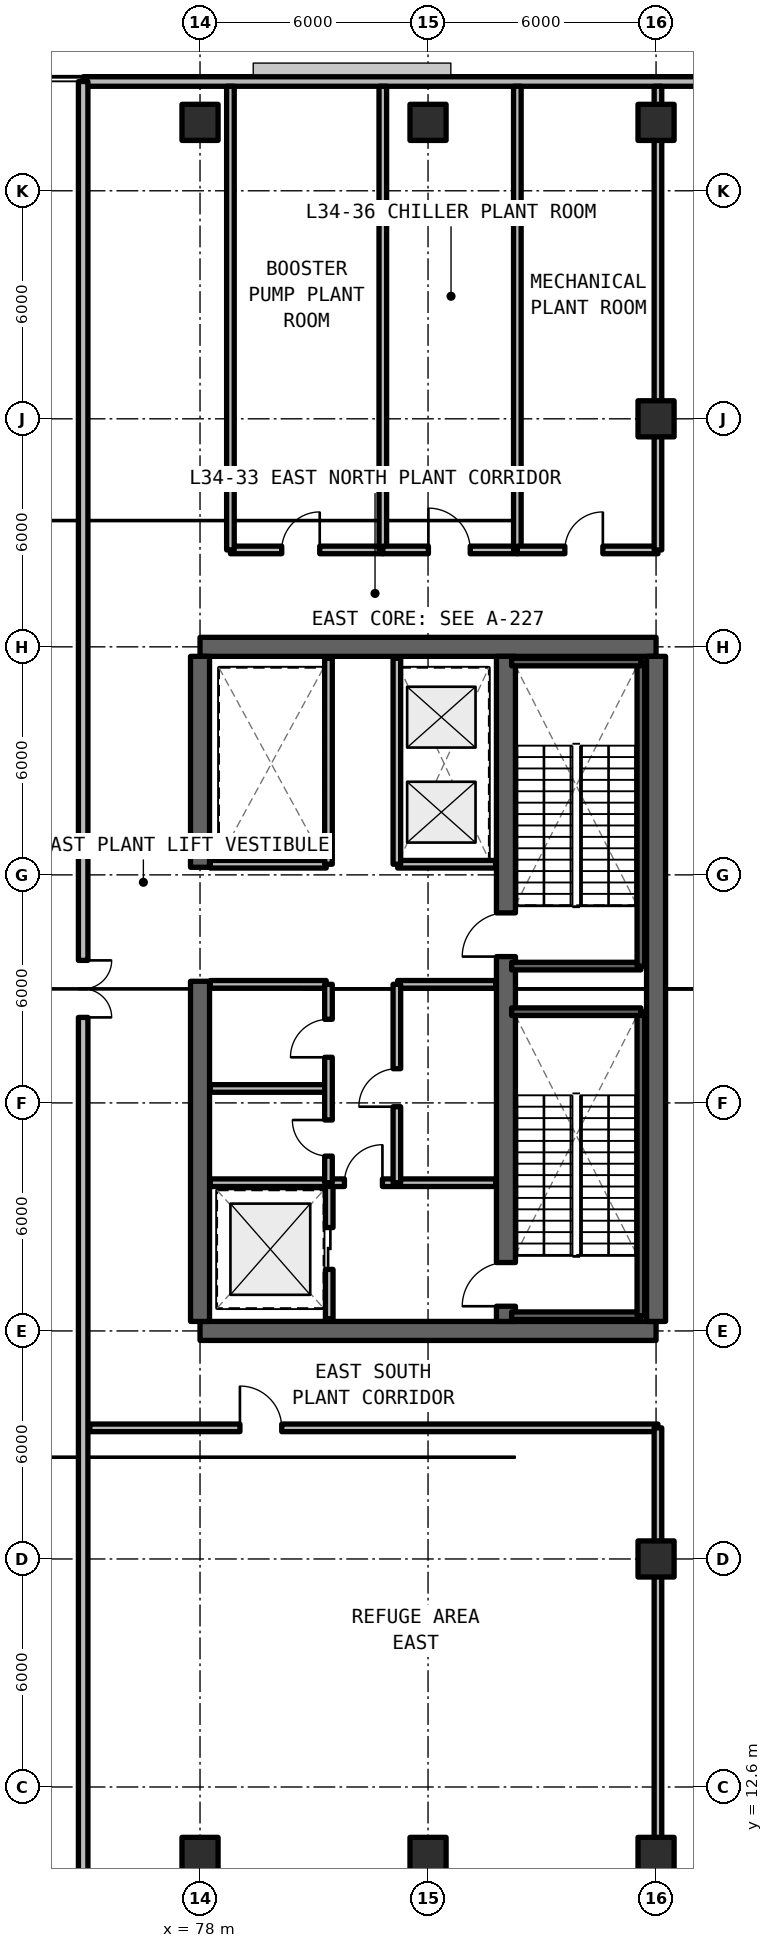
"""IFC4 building model, lengths in metres.
Left out: names, types, materials, properties, quantities, classifications, styles, units other than length and angle.
Written with IfcOpenShell. Run it as: python <this file> out.ifc"""

import sys

from ifc_helpers import new_model, si_unit, direction, frame, frame_2d, origin, origin_2d, place, context, subcontext, project, spatial, rectangle, extrude, element, fill, save


model = new_model("IFC4")
c1 = context("Model", 3, precision=1e-05, world=origin(), true_north=direction((0.0, 1.0)))
c2 = subcontext(c1, "Body", "Model", "MODEL_VIEW")
j1 = project(units=[si_unit("LENGTHUNIT", "METRE"), si_unit("PLANEANGLEUNIT", "RADIAN")], contexts=[c1])
p1 = place(None, origin())
s1 = spatial("IfcSite", under=j1, at=p1, CompositionType="ELEMENT")
p2 = place(p1, origin())
s2 = spatial("IfcBuilding", under=s1, at=p2, CompositionType="ELEMENT")
p3 = place(p2, frame((0.0, 0.0, 123.09)))
s3 = spatial("IfcBuildingStorey", under=s2, at=p3, CompositionType="ELEMENT", Elevation=123.09)
for number, where, z_axis, x_axis in (
    (1, (78.0, 24.6, 0.0), (0.0, 0.0, 1.0), (1.0, 0.0, 0.0)),
    (2, (90.0, 42.6, 0.0), (0.0, 0.0, 1.0), (-1.0, 0.0, 0.0)),
):
    element("IfcWall", number, at=place(p3, frame(where, z_axis=z_axis, x_axis=x_axis)), inside=s3, PredefinedType="SHEAR", context=c2, shape_type="SweptSolid", body=[
        extrude(rectangle(XDim=12.0, YDim=0.5, at=frame_2d((6.0, 0.0))), origin(), (0.0, 0.0, 1.0), 4.95),
    ])
p4 = place(p3, frame((90.0, 24.85, 0.0), z_axis=(0.0, 0.0, 1.0), x_axis=(0.0, 1.0, 0.0)))
e3 = element("IfcWall", 3, at=p4, inside=s3, PredefinedType="SHEAR", context=c2, shape_type="SweptSolid", body=[
    extrude(rectangle(XDim=17.5, YDim=0.5, at=frame_2d((8.75, 0.0))), origin(), (0.0, 0.0, 1.0), 4.95),
])
p5 = place(p3, frame((78.0, 24.85, 0.0), z_axis=(0.0, 0.0, 1.0), x_axis=(0.0, 1.0, 0.0)))
e4 = element("IfcWall", 4, at=p5, inside=s3, PredefinedType="SHEAR", context=c2, shape_type="SweptSolid", body=[
    extrude(rectangle(XDim=8.95, YDim=0.5, at=frame_2d((4.475, 0.0))), origin(), (0.0, 0.0, 1.0), 4.95),
])
p6 = place(p3, frame((78.0, 36.8, 0.0), z_axis=(0.0, 0.0, 1.0), x_axis=(0.0, 1.0, 0.0)))
e5 = element("IfcWall", 5, at=p6, inside=s3, PredefinedType="SHEAR", context=c2, shape_type="SweptSolid", body=[
    extrude(rectangle(XDim=5.55, YDim=0.5, at=frame_2d((2.775, 0.0))), origin(), (0.0, 0.0, 1.0), 4.95),
])
p7 = place(p3, frame((86.05, 24.85, 0.0), z_axis=(0.0, 0.0, 1.0), x_axis=(0.0, 1.0, 0.0)))
e6 = element("IfcWall", 6, at=p7, inside=s3, PredefinedType="SHEAR", context=c2, shape_type="SweptSolid", body=[
    extrude(rectangle(XDim=17.5, YDim=0.5, at=frame_2d((8.75, 0.0))), origin(), (0.0, 0.0, 1.0), 4.95),
])
p8 = place(p7, frame((0.4, 0.0, 0.0)))
e7 = element("IfcOpeningElement", 7, at=p8, cuts=e6, PredefinedType="OPENING", context=c2, shape_type="SweptSolid", body=[
    extrude(rectangle(XDim=1.15, YDim=2.15, at=frame_2d((0.575, 1.075))), frame((0.0, 0.26, 0.0), z_axis=(0.0, -1.0, 0.0), x_axis=(1.0, 0.0, 0.0)), (0.0, 0.0, 1.0), 0.52),
])
p9 = place(p7, frame((9.6, 0.0, 0.0)))
e8 = element("IfcOpeningElement", 8, at=p9, cuts=e6, PredefinedType="OPENING", context=c2, shape_type="SweptSolid", body=[
    extrude(rectangle(XDim=1.15, YDim=2.15, at=frame_2d((0.575, 1.075))), frame((0.0, 0.26, 0.0), z_axis=(0.0, -1.0, 0.0), x_axis=(1.0, 0.0, 0.0)), (0.0, 0.0, 1.0), 0.52),
])
for number, where, z_axis, x_axis in (
    (9, (90.0, 18.6, 0.0), (0.0, 0.0, 1.0), (1.0, 0.0, 0.0)),
    (10, (90.0, 48.6, 0.0), (0.0, 0.0, 1.0), (1.0, 0.0, 0.0)),
):
    element("IfcColumn", number, at=place(p3, frame(where, z_axis=z_axis, x_axis=x_axis)), inside=s3, PredefinedType="COLUMN", context=c2, shape_type="SweptSolid", body=[
        extrude(rectangle(XDim=0.95, YDim=0.95, at=origin_2d()), origin(), (0.0, 0.0, 1.0), 4.95),
    ])
for number, where, z_axis, x_axis in (
    (11, (78.0, 10.8, 0.0), (0.0, 0.0, 1.0), (1.0, 0.0, 0.0)),
    (12, (78.0, 56.4, 0.0), (0.0, 0.0, 1.0), (1.0, 0.0, 0.0)),
    (13, (84.0, 10.8, 0.0), (0.0, 0.0, 1.0), (1.0, 0.0, 0.0)),
    (14, (84.0, 56.4, 0.0), (0.0, 0.0, 1.0), (1.0, 0.0, 0.0)),
    (15, (90.0, 10.8, 0.0), (0.0, 0.0, 1.0), (1.0, 0.0, 0.0)),
    (16, (90.0, 56.4, 0.0), (0.0, 0.0, 1.0), (1.0, 0.0, 0.0)),
):
    element("IfcColumn", number, at=place(p3, frame(where, z_axis=z_axis, x_axis=x_axis)), inside=s3, PredefinedType="COLUMN", context=c2, shape_type="SweptSolid", body=[
        extrude(rectangle(XDim=0.95, YDim=0.95, at=origin_2d()), origin(), (0.0, 0.0, 1.0), 4.67),
    ])
p10 = place(p3, frame((96.148, 57.475, 0.0), z_axis=(0.0, 0.0, 1.0), x_axis=(-1.0, 0.0, 0.0)))
e17 = element("IfcWall", 17, at=p10, inside=s3, PredefinedType="SOLIDWALL", context=c2, shape_type="SweptSolid", body=[
    extrude(rectangle(XDim=21.223, YDim=0.25, at=frame_2d((10.612, 0.0))), origin(), (0.0, 0.0, 1.0), 4.67),
])
p11 = place(p3, frame((74.925, 57.475, 0.0), z_axis=(0.0, 0.0, 1.0), x_axis=(0.0, -1.0, 0.0)))
e18 = element("IfcWall", 18, at=p11, inside=s3, PredefinedType="SOLIDWALL", context=c2, shape_type="SweptSolid", body=[
    extrude(rectangle(XDim=47.75, YDim=0.25, at=frame_2d((23.875, 0.0))), origin(), (0.0, 0.0, 1.0), 4.67),
])
p12 = place(p11, frame((23.125, 0.0, 0.0)))
e19 = element("IfcOpeningElement", 19, at=p12, cuts=e18, PredefinedType="OPENING", context=c2, shape_type="SweptSolid", body=[
    extrude(rectangle(XDim=1.5, YDim=2.2, at=frame_2d((0.75, 1.1))), frame((0.0, 0.135, 0.0), z_axis=(0.0, -1.0, 0.0), x_axis=(1.0, 0.0, 0.0)), (0.0, 0.0, 1.0), 0.27),
])
p13 = place(p3, frame((81.4, 24.92, 0.0), z_axis=(0.0, 0.0, 1.0), x_axis=(0.0, 1.0, 0.0)))
e20 = element("IfcWall", 20, at=p13, inside=s3, PredefinedType="SOLIDWALL", context=c2, shape_type="SweptSolid", body=[
    extrude(rectangle(XDim=3.58, YDim=0.2, at=frame_2d((1.79, 0.0))), origin(), (0.0, 0.0, 1.0), 3.89),
])
p14 = place(p13, frame((1.3, 0.0, 0.0)))
e21 = element("IfcOpeningElement", 21, at=p14, cuts=e20, PredefinedType="OPENING", context=c2, shape_type="SweptSolid", body=[
    extrude(rectangle(XDim=1.1, YDim=2.2, at=frame_2d((0.55, 1.1))), frame((0.0, 0.11, 0.0), z_axis=(0.0, -1.0, 0.0), x_axis=(1.0, 0.0, 0.0)), (0.0, 0.0, 1.0), 0.22),
])
p15 = place(p3, frame((78.27, 28.5, 0.0), z_axis=(0.0, 0.0, 1.0), x_axis=(1.0, 0.0, 0.0)))
e22 = element("IfcWall", 22, at=p15, inside=s3, PredefinedType="SOLIDWALL", context=c2, shape_type="SweptSolid", body=[
    extrude(rectangle(XDim=7.51, YDim=0.2, at=frame_2d((3.755, 0.0))), origin(), (0.0, 0.0, 1.0), 3.89),
])
p16 = place(p15, frame((3.53, 0.0, 0.0)))
e23 = element("IfcOpeningElement", 23, at=p16, cuts=e22, PredefinedType="OPENING", context=c2, shape_type="SweptSolid", body=[
    extrude(rectangle(XDim=1.0, YDim=2.15, at=frame_2d((0.5, 1.075))), frame((0.0, 0.11, 0.0), z_axis=(0.0, -1.0, 0.0), x_axis=(1.0, 0.0, 0.0)), (0.0, 0.0, 1.0), 0.22),
])
p17 = place(p3, frame((83.2, 33.72, 0.0), z_axis=(0.0, 0.0, 1.0), x_axis=(1.0, 0.0, 0.0)))
e24 = element("IfcWall", 24, at=p17, inside=s3, PredefinedType="SOLIDWALL", context=c2, shape_type="SweptSolid", body=[
    extrude(rectangle(XDim=2.58, YDim=0.2, at=frame_2d((1.29, 0.0))), origin(), (0.0, 0.0, 1.0), 3.89),
])
p18 = place(p3, frame((83.18, 28.5, 0.0), z_axis=(0.0, 0.0, 1.0), x_axis=(0.0, 1.0, 0.0)))
e25 = element("IfcWall", 25, at=p18, inside=s3, PredefinedType="SOLIDWALL", context=c2, shape_type="SweptSolid", body=[
    extrude(rectangle(XDim=5.22, YDim=0.2, at=frame_2d((2.61, 0.0))), origin(), (0.0, 0.0, 1.0), 3.89),
])
p19 = place(p18, frame((2.0, 0.0, 0.0)))
e26 = element("IfcOpeningElement", 26, at=p19, cuts=e25, PredefinedType="OPENING", context=c2, shape_type="SweptSolid", body=[
    extrude(rectangle(XDim=1.0, YDim=2.15, at=frame_2d((0.5, 1.075))), frame((0.0, 0.11, 0.0), z_axis=(0.0, -1.0, 0.0), x_axis=(1.0, 0.0, 0.0)), (0.0, 0.0, 1.0), 0.22),
])
for number, where, z_axis, x_axis in (
    (27, (78.27, 30.98, 0.0), (0.0, 0.0, 1.0), (1.0, 0.0, 0.0)),
    (28, (78.27, 33.72, 0.0), (0.0, 0.0, 1.0), (1.0, 0.0, 0.0)),
):
    element("IfcWall", number, at=place(p3, frame(where, z_axis=z_axis, x_axis=x_axis)), inside=s3, PredefinedType="SOLIDWALL", context=c2, shape_type="SweptSolid", body=[
        extrude(rectangle(XDim=3.05, YDim=0.2, at=frame_2d((1.525, 0.0))), origin(), (0.0, 0.0, 1.0), 3.89),
    ])
p20 = place(p3, frame((81.38, 28.5, 0.0), z_axis=(0.0, 0.0, 1.0), x_axis=(0.0, 1.0, 0.0)))
e29 = element("IfcWall", 29, at=p20, inside=s3, PredefinedType="SOLIDWALL", context=c2, shape_type="SweptSolid", body=[
    extrude(rectangle(XDim=5.22, YDim=0.2, at=frame_2d((2.61, 0.0))), origin(), (0.0, 0.0, 1.0), 3.89),
])
p21 = place(p20, frame((0.7, 0.0, 0.0)))
e30 = element("IfcOpeningElement", 30, at=p21, cuts=e29, PredefinedType="OPENING", context=c2, shape_type="SweptSolid", body=[
    extrude(rectangle(XDim=0.95, YDim=2.15, at=frame_2d((0.475, 1.075))), frame((0.0, 0.11, 0.0), z_axis=(0.0, -1.0, 0.0), x_axis=(1.0, 0.0, 0.0)), (0.0, 0.0, 1.0), 0.22),
])
p22 = place(p20, frame((3.3, 0.0, 0.0)))
e31 = element("IfcOpeningElement", 31, at=p22, cuts=e29, PredefinedType="OPENING", context=c2, shape_type="SweptSolid", body=[
    extrude(rectangle(XDim=1.0, YDim=2.15, at=frame_2d((0.5, 1.075))), frame((0.0, 0.11, 0.0), z_axis=(0.0, -1.0, 0.0), x_axis=(1.0, 0.0, 0.0)), (0.0, 0.0, 1.0), 0.22),
])
p23 = place(p3, frame((83.2, 36.88, 0.0), z_axis=(0.0, 0.0, 1.0), x_axis=(1.0, 0.0, 0.0)))
e32 = element("IfcWall", 32, at=p23, inside=s3, PredefinedType="SOLIDWALL", context=c2, shape_type="SweptSolid", body=[
    extrude(rectangle(XDim=2.58, YDim=0.2, at=frame_2d((1.29, 0.0))), origin(), (0.0, 0.0, 1.0), 3.89),
])
p24 = place(p3, frame((83.18, 36.88, 0.0), z_axis=(0.0, 0.0, 1.0), x_axis=(0.0, 1.0, 0.0)))
e33 = element("IfcWall", 33, at=p24, inside=s3, PredefinedType="SOLIDWALL", context=c2, shape_type="SweptSolid", body=[
    extrude(rectangle(XDim=5.42, YDim=0.2, at=frame_2d((2.71, 0.0))), origin(), (0.0, 0.0, 1.0), 3.89),
])
p25 = place(p3, frame((78.27, 36.88, 0.0), z_axis=(0.0, 0.0, 1.0), x_axis=(1.0, 0.0, 0.0)))
e34 = element("IfcWall", 34, at=p25, inside=s3, PredefinedType="SOLIDWALL", context=c2, shape_type="SweptSolid", body=[
    extrude(rectangle(XDim=3.05, YDim=0.2, at=frame_2d((1.525, 0.0))), origin(), (0.0, 0.0, 1.0), 3.89),
])
p26 = place(p3, frame((81.38, 36.88, 0.0), z_axis=(0.0, 0.0, 1.0), x_axis=(0.0, 1.0, 0.0)))
e35 = element("IfcWall", 35, at=p26, inside=s3, PredefinedType="SOLIDWALL", context=c2, shape_type="SweptSolid", body=[
    extrude(rectangle(XDim=5.42, YDim=0.2, at=frame_2d((2.71, 0.0))), origin(), (0.0, 0.0, 1.0), 3.89),
])
p27 = place(p3, frame((75.1, 22.05, 0.0), z_axis=(0.0, 0.0, 1.0), x_axis=(1.0, 0.0, 0.0)))
e36 = element("IfcWall", 36, at=p27, inside=s3, PredefinedType="SOLIDWALL", context=c2, shape_type="SweptSolid", body=[
    extrude(rectangle(XDim=14.95, YDim=0.2, at=frame_2d((7.475, 0.0))), origin(), (0.0, 0.0, 1.0), 3.89),
])
p28 = place(p27, frame((3.95, 0.0, 0.0)))
e37 = element("IfcOpeningElement", 37, at=p28, cuts=e36, PredefinedType="OPENING", context=c2, shape_type="SweptSolid", body=[
    extrude(rectangle(XDim=1.1, YDim=2.15, at=frame_2d((0.55, 1.075))), frame((0.0, 0.11, 0.0), z_axis=(0.0, -1.0, 0.0), x_axis=(1.0, 0.0, 0.0)), (0.0, 0.0, 1.0), 0.22),
])
p29 = place(p3, frame((90.05, 9.85, 0.0), z_axis=(0.0, 0.0, 1.0), x_axis=(0.0, 1.0, 0.0)))
e38 = element("IfcWall", 38, at=p29, inside=s3, PredefinedType="SOLIDWALL", context=c2, shape_type="SweptSolid", body=[
    extrude(rectangle(XDim=12.2, YDim=0.2, at=frame_2d((6.1, 0.0))), origin(), (0.0, 0.0, 1.0), 3.647),
])
p30 = place(p3, frame((78.8, 45.15, 0.0), z_axis=(0.0, 0.0, 1.0), x_axis=(1.0, 0.0, 0.0)))
e39 = element("IfcWall", 39, at=p30, inside=s3, PredefinedType="SOLIDWALL", context=c2, shape_type="SweptSolid", body=[
    extrude(rectangle(XDim=4.01, YDim=0.2, at=frame_2d((2.005, 0.0))), origin(), (0.0, 0.0, 1.0), 3.89),
])
p31 = place(p30, frame((1.35, 0.0, 0.0)))
e40 = element("IfcOpeningElement", 40, at=p31, cuts=e39, PredefinedType="OPENING", context=c2, shape_type="SweptSolid", body=[
    extrude(rectangle(XDim=1.0, YDim=2.15, at=frame_2d((0.5, 1.075))), frame((0.0, 0.11, 0.0), z_axis=(0.0, -1.0, 0.0), x_axis=(1.0, 0.0, 0.0)), (0.0, 0.0, 1.0), 0.22),
])
for number, where, z_axis, x_axis in (
    (41, (78.8, 45.15, 0.0), (0.0, 0.0, 1.0), (0.0, 1.0, 0.0)),
    (42, (82.81, 45.15, 0.0), (0.0, 0.0, 1.0), (0.0, 1.0, 0.0)),
):
    element("IfcWall", number, at=place(p3, frame(where, z_axis=z_axis, x_axis=x_axis)), inside=s3, PredefinedType="SOLIDWALL", context=c2, shape_type="SweptSolid", body=[
        extrude(rectangle(XDim=12.2, YDim=0.2, at=frame_2d((6.1, 0.0))), origin(), (0.0, 0.0, 1.0), 3.89),
    ])
p32 = place(p3, frame((82.81, 45.15, 0.0), z_axis=(0.0, 0.0, 1.0), x_axis=(1.0, 0.0, 0.0)))
e43 = element("IfcWall", 43, at=p32, inside=s3, PredefinedType="SOLIDWALL", context=c2, shape_type="SweptSolid", body=[
    extrude(rectangle(XDim=3.54, YDim=0.2, at=frame_2d((1.77, 0.0))), origin(), (0.0, 0.0, 1.0), 3.89),
])
p33 = place(p32, frame((1.2, 0.0, 0.0)))
e44 = element("IfcOpeningElement", 44, at=p33, cuts=e43, PredefinedType="OPENING", context=c2, shape_type="SweptSolid", body=[
    extrude(rectangle(XDim=1.1, YDim=2.15, at=frame_2d((0.55, 1.075))), frame((0.0, 0.11, 0.0), z_axis=(0.0, -1.0, 0.0), x_axis=(1.0, 0.0, 0.0)), (0.0, 0.0, 1.0), 0.22),
])
p34 = place(p3, frame((86.35, 45.15, 0.0), z_axis=(0.0, 0.0, 1.0), x_axis=(0.0, 1.0, 0.0)))
e45 = element("IfcWall", 45, at=p34, inside=s3, PredefinedType="SOLIDWALL", context=c2, shape_type="SweptSolid", body=[
    extrude(rectangle(XDim=12.2, YDim=0.2, at=frame_2d((6.1, 0.0))), origin(), (0.0, 0.0, 1.0), 3.89),
])
p35 = place(p3, frame((86.35, 45.15, 0.0), z_axis=(0.0, 0.0, 1.0), x_axis=(1.0, 0.0, 0.0)))
e46 = element("IfcWall", 46, at=p35, inside=s3, PredefinedType="SOLIDWALL", context=c2, shape_type="SweptSolid", body=[
    extrude(rectangle(XDim=3.7, YDim=0.2, at=frame_2d((1.85, 0.0))), origin(), (0.0, 0.0, 1.0), 3.89),
])
p36 = place(p35, frame((1.25, 0.0, 0.0)))
e47 = element("IfcOpeningElement", 47, at=p36, cuts=e46, PredefinedType="OPENING", context=c2, shape_type="SweptSolid", body=[
    extrude(rectangle(XDim=1.0, YDim=2.15, at=frame_2d((0.5, 1.075))), frame((0.0, 0.11, 0.0), z_axis=(0.0, -1.0, 0.0), x_axis=(1.0, 0.0, 0.0)), (0.0, 0.0, 1.0), 0.22),
])
p37 = place(p3, frame((90.05, 45.15, 0.0), z_axis=(0.0, 0.0, 1.0), x_axis=(0.0, 1.0, 0.0)))
e48 = element("IfcWall", 48, at=p37, inside=s3, PredefinedType="SOLIDWALL", context=c2, shape_type="SweptSolid", body=[
    extrude(rectangle(XDim=12.2, YDim=0.2, at=frame_2d((6.1, 0.0))), origin(), (0.0, 0.0, 1.0), 3.647),
])
p38 = place(p3, frame((86.2, 25.0, 0.0), z_axis=(0.0, 0.0, 1.0), x_axis=(1.0, 0.0, 0.0)))
e49 = element("IfcWall", 49, at=p38, inside=s3, PredefinedType="SOLIDWALL", context=c2, shape_type="SweptSolid", body=[
    extrude(rectangle(XDim=3.4, YDim=0.2, at=frame_2d((1.7, 0.0))), origin(), (0.0, 0.0, 1.0), 4.95),
])
p39 = place(p3, frame((89.6, 25.0, 0.0), z_axis=(0.0, 0.0, 1.0), x_axis=(0.0, 1.0, 0.0)))
e50 = element("IfcWall", 50, at=p39, inside=s3, PredefinedType="SOLIDWALL", context=c2, shape_type="SweptSolid", body=[
    extrude(rectangle(XDim=8.0, YDim=0.2, at=frame_2d((4.0, 0.0))), origin(), (0.0, 0.0, 1.0), 4.95),
])
for number, where, z_axis, x_axis in (
    (51, (89.6, 33.0, 0.0), (0.0, 0.0, 1.0), (-1.0, 0.0, 0.0)),
    (52, (86.2, 34.2, 0.0), (0.0, 0.0, 1.0), (1.0, 0.0, 0.0)),
):
    element("IfcWall", number, at=place(p3, frame(where, z_axis=z_axis, x_axis=x_axis)), inside=s3, PredefinedType="SOLIDWALL", context=c2, shape_type="SweptSolid", body=[
        extrude(rectangle(XDim=3.4, YDim=0.2, at=frame_2d((1.7, 0.0))), origin(), (0.0, 0.0, 1.0), 4.95),
    ])
p40 = place(p3, frame((89.6, 34.2, 0.0), z_axis=(0.0, 0.0, 1.0), x_axis=(0.0, 1.0, 0.0)))
e53 = element("IfcWall", 53, at=p40, inside=s3, PredefinedType="SOLIDWALL", context=c2, shape_type="SweptSolid", body=[
    extrude(rectangle(XDim=8.0, YDim=0.2, at=frame_2d((4.0, 0.0))), origin(), (0.0, 0.0, 1.0), 4.95),
])
p41 = place(p3, frame((89.6, 42.2, 0.0), z_axis=(0.0, 0.0, 1.0), x_axis=(-1.0, 0.0, 0.0)))
e54 = element("IfcWall", 54, at=p41, inside=s3, PredefinedType="SOLIDWALL", context=c2, shape_type="SweptSolid", body=[
    extrude(rectangle(XDim=3.4, YDim=0.2, at=frame_2d((1.7, 0.0))), origin(), (0.0, 0.0, 1.0), 4.95),
])
p42 = place(p12, origin())
e55 = element("IfcDoor", 55, at=p42, inside=s3, OperationType="SINGLE_SWING_LEFT", PredefinedType="DOOR", context=c2, shape_type="SweptSolid", body=[
    extrude(rectangle(XDim=1.5, YDim=2.2, at=frame_2d((0.75, 1.1))), frame((0.0, 0.025, 0.0), z_axis=(0.0, -1.0, 0.0), x_axis=(1.0, 0.0, 0.0)), (0.0, 0.0, 1.0), 0.05),
])
fill(e19, e55)
p43 = place(p14, origin())
e56 = element("IfcDoor", 56, at=p43, inside=s3, OperationType="SLIDING_TO_LEFT", PredefinedType="DOOR", context=c2, shape_type="SweptSolid", body=[
    extrude(rectangle(XDim=1.1, YDim=2.2, at=frame_2d((0.55, 1.1))), frame((0.0, 0.025, 0.0), z_axis=(0.0, -1.0, 0.0), x_axis=(1.0, 0.0, 0.0)), (0.0, 0.0, 1.0), 0.05),
])
fill(e21, e56)
p44 = place(p16, origin())
e57 = element("IfcDoor", 57, at=p44, inside=s3, OperationType="SINGLE_SWING_RIGHT", PredefinedType="DOOR", context=c2, shape_type="SweptSolid", body=[
    extrude(rectangle(XDim=1.0, YDim=2.15, at=frame_2d((0.5, 1.075))), frame((0.0, 0.025, 0.0), z_axis=(0.0, -1.0, 0.0), x_axis=(1.0, 0.0, 0.0)), (0.0, 0.0, 1.0), 0.05),
])
fill(e23, e57)
p45 = place(p19, origin())
e58 = element("IfcDoor", 58, at=p45, inside=s3, OperationType="SINGLE_SWING_LEFT", PredefinedType="DOOR", context=c2, shape_type="SweptSolid", body=[
    extrude(rectangle(XDim=1.0, YDim=2.15, at=frame_2d((0.5, 1.075))), frame((0.0, 0.025, 0.0), z_axis=(0.0, -1.0, 0.0), x_axis=(1.0, 0.0, 0.0)), (0.0, 0.0, 1.0), 0.05),
])
fill(e26, e58)
p46 = place(p21, origin())
e59 = element("IfcDoor", 59, at=p46, inside=s3, OperationType="SINGLE_SWING_RIGHT", PredefinedType="DOOR", context=c2, shape_type="SweptSolid", body=[
    extrude(rectangle(XDim=0.95, YDim=2.15, at=frame_2d((0.475, 1.075))), frame((0.0, 0.025, 0.0), z_axis=(0.0, -1.0, 0.0), x_axis=(1.0, 0.0, 0.0)), (0.0, 0.0, 1.0), 0.05),
])
fill(e30, e59)
p47 = place(p22, origin())
e60 = element("IfcDoor", 60, at=p47, inside=s3, OperationType="SINGLE_SWING_LEFT", PredefinedType="DOOR", context=c2, shape_type="SweptSolid", body=[
    extrude(rectangle(XDim=1.0, YDim=2.15, at=frame_2d((0.5, 1.075))), frame((0.0, 0.025, 0.0), z_axis=(0.0, -1.0, 0.0), x_axis=(1.0, 0.0, 0.0)), (0.0, 0.0, 1.0), 0.05),
])
fill(e31, e60)
p48 = place(p28, origin())
e61 = element("IfcDoor", 61, at=p48, inside=s3, OperationType="SINGLE_SWING_LEFT", PredefinedType="DOOR", context=c2, shape_type="SweptSolid", body=[
    extrude(rectangle(XDim=1.1, YDim=2.15, at=frame_2d((0.55, 1.075))), frame((0.0, 0.025, 0.0), z_axis=(0.0, -1.0, 0.0), x_axis=(1.0, 0.0, 0.0)), (0.0, 0.0, 1.0), 0.05),
])
fill(e37, e61)
p49 = place(p31, origin())
e62 = element("IfcDoor", 62, at=p49, inside=s3, OperationType="SINGLE_SWING_RIGHT", PredefinedType="DOOR", context=c2, shape_type="SweptSolid", body=[
    extrude(rectangle(XDim=1.0, YDim=2.15, at=frame_2d((0.5, 1.075))), frame((0.0, 0.025, 0.0), z_axis=(0.0, -1.0, 0.0), x_axis=(1.0, 0.0, 0.0)), (0.0, 0.0, 1.0), 0.05),
])
fill(e40, e62)
p50 = place(p33, origin())
e63 = element("IfcDoor", 63, at=p50, inside=s3, OperationType="SINGLE_SWING_LEFT", PredefinedType="DOOR", context=c2, shape_type="SweptSolid", body=[
    extrude(rectangle(XDim=1.1, YDim=2.15, at=frame_2d((0.55, 1.075))), frame((0.0, 0.025, 0.0), z_axis=(0.0, -1.0, 0.0), x_axis=(1.0, 0.0, 0.0)), (0.0, 0.0, 1.0), 0.05),
])
fill(e44, e63)
p51 = place(p36, origin())
e64 = element("IfcDoor", 64, at=p51, inside=s3, OperationType="SINGLE_SWING_RIGHT", PredefinedType="DOOR", context=c2, shape_type="SweptSolid", body=[
    extrude(rectangle(XDim=1.0, YDim=2.15, at=frame_2d((0.5, 1.075))), frame((0.0, 0.025, 0.0), z_axis=(0.0, -1.0, 0.0), x_axis=(1.0, 0.0, 0.0)), (0.0, 0.0, 1.0), 0.05),
])
fill(e47, e64)
p52 = place(p8, origin())
e65 = element("IfcDoor", 65, at=p52, inside=s3, OperationType="SINGLE_SWING_LEFT", PredefinedType="DOOR", context=c2, shape_type="SweptSolid", body=[
    extrude(rectangle(XDim=1.15, YDim=2.15, at=frame_2d((0.575, 1.075))), frame((0.0, 0.025, 0.0), z_axis=(0.0, -1.0, 0.0), x_axis=(1.0, 0.0, 0.0)), (0.0, 0.0, 1.0), 0.05),
])
fill(e7, e65)
p53 = place(p9, origin())
e66 = element("IfcDoor", 66, at=p53, inside=s3, OperationType="SINGLE_SWING_RIGHT", PredefinedType="DOOR", context=c2, shape_type="SweptSolid", body=[
    extrude(rectangle(XDim=1.15, YDim=2.15, at=frame_2d((0.575, 1.075))), frame((0.0, 0.025, 0.0), z_axis=(0.0, -1.0, 0.0), x_axis=(1.0, 0.0, 0.0)), (0.0, 0.0, 1.0), 0.05),
])
fill(e8, e66)
save(model, sys.argv[1])
